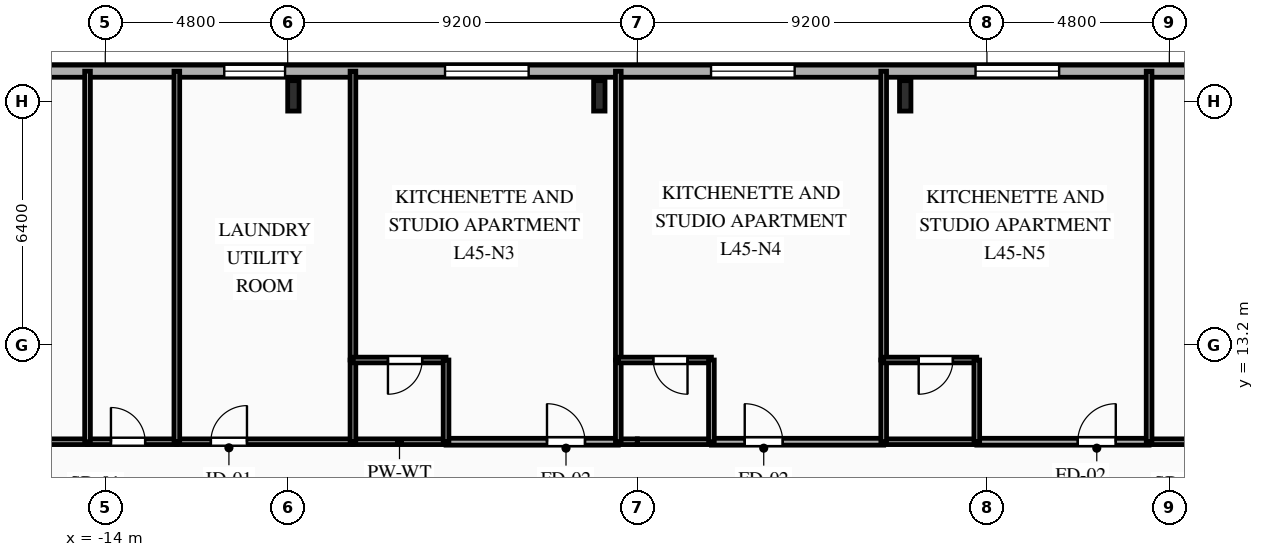
"""IFC4 building model, lengths in metres.
Left out: names, types, materials, properties, quantities, classifications, styles, units other than length and angle.
Written with IfcOpenShell. Run it as: python <this file> out.ifc"""

import sys

from ifc_helpers import new_model, si_unit, direction, frame, frame_2d, origin, origin_2d, place, context, subcontext, project, spatial, rectangle, i_section, extrude, element, fill, save


model = new_model("IFC4")
c1 = context("Model", 3, precision=1e-05, world=origin(), true_north=direction((0.0, 1.0)))
c2 = subcontext(c1, "Body", "Model", "MODEL_VIEW")
j1 = project(units=[si_unit("LENGTHUNIT", "METRE"), si_unit("PLANEANGLEUNIT", "RADIAN")], contexts=[c1])
p1 = place(None, origin())
s1 = spatial("IfcSite", under=j1, at=p1, CompositionType="ELEMENT")
p2 = place(p1, origin())
s2 = spatial("IfcBuilding", under=s1, at=p2, CompositionType="ELEMENT")
p3 = place(p2, frame((0.0, 0.0, 161.15)))
s3 = spatial("IfcBuildingStorey", under=s2, at=p3, CompositionType="ELEMENT", Elevation=161.15)
for number, where, z_axis, x_axis in (
    (1, (7.05, 19.75, 0.0), (0.0, 0.0, 1.0), (1.0, 0.0, 0.0)),
    (2, (-1.0, 19.75, 0.0), (0.0, 0.0, 1.0), (1.0, 0.0, 0.0)),
    (3, (-9.05, 19.75, 0.0), (0.0, 0.0, 1.0), (1.0, 0.0, 0.0)),
):
    element("IfcColumn", number, at=place(p3, frame(where, z_axis=z_axis, x_axis=x_axis)), inside=s3, PredefinedType="COLUMN", context=c2, shape_type="SweptSolid", body=[
        extrude(i_section(OverallWidth=0.3, OverallDepth=0.8, WebThickness=0.018, FlangeThickness=0.033, FilletRadius=0.03, at=origin_2d()), origin(), (0.0, 0.0, 1.0), 3.35),
    ])
p4 = place(p3, frame((-25.8, 20.4, 0.0), z_axis=(0.0, 0.0, 1.0), x_axis=(1.0, 0.0, 0.0)))
e4 = element("IfcWall", 4, at=p4, inside=s3, PredefinedType="SOLIDWALL", context=c2, shape_type="SweptSolid", body=[
    extrude(rectangle(XDim=49.6, YDim=0.32, at=frame_2d((24.8, 0.0))), origin(), (0.0, 0.0, 1.0), 3.04),
])
p5 = place(p4, frame((2.135, 0.0, 0.85)))
e5 = element("IfcOpeningElement", 5, at=p5, cuts=e4, PredefinedType="OPENING", context=c2, shape_type="SweptSolid", body=[
    extrude(rectangle(XDim=1.65, YDim=1.85, at=frame_2d((0.825, 0.925))), frame((0.0, 0.17, 0.0), z_axis=(0.0, -1.0, 0.0), x_axis=(1.0, 0.0, 0.0)), (0.0, 0.0, 1.0), 0.34),
])
p6 = place(p4, frame((6.706, 0.0, 0.85)))
e6 = element("IfcOpeningElement", 6, at=p6, cuts=e4, PredefinedType="OPENING", context=c2, shape_type="SweptSolid", body=[
    extrude(rectangle(XDim=1.65, YDim=1.85, at=frame_2d((0.825, 0.925))), frame((0.0, 0.17, 0.0), z_axis=(0.0, -1.0, 0.0), x_axis=(1.0, 0.0, 0.0)), (0.0, 0.0, 1.0), 0.34),
])
p7 = place(p4, frame((14.931, 0.0, 0.85)))
e7 = element("IfcOpeningElement", 7, at=p7, cuts=e4, PredefinedType="OPENING", context=c2, shape_type="SweptSolid", body=[
    extrude(rectangle(XDim=1.6, YDim=1.85, at=frame_2d((0.8, 0.925))), frame((0.0, 0.17, 0.0), z_axis=(0.0, -1.0, 0.0), x_axis=(1.0, 0.0, 0.0)), (0.0, 0.0, 1.0), 0.34),
])
p8 = place(p4, frame((20.74, 0.0, 0.85)))
e8 = element("IfcOpeningElement", 8, at=p8, cuts=e4, PredefinedType="OPENING", context=c2, shape_type="SweptSolid", body=[
    extrude(rectangle(XDim=2.2, YDim=1.85, at=frame_2d((1.1, 0.925))), frame((0.0, 0.17, 0.0), z_axis=(0.0, -1.0, 0.0), x_axis=(1.0, 0.0, 0.0)), (0.0, 0.0, 1.0), 0.34),
])
p9 = place(p4, frame((27.74, 0.0, 0.85)))
e9 = element("IfcOpeningElement", 9, at=p9, cuts=e4, PredefinedType="OPENING", context=c2, shape_type="SweptSolid", body=[
    extrude(rectangle(XDim=2.2, YDim=1.85, at=frame_2d((1.1, 0.925))), frame((0.0, 0.17, 0.0), z_axis=(0.0, -1.0, 0.0), x_axis=(1.0, 0.0, 0.0)), (0.0, 0.0, 1.0), 0.34),
])
p10 = place(p4, frame((34.7, 0.0, 0.85)))
e10 = element("IfcOpeningElement", 10, at=p10, cuts=e4, PredefinedType="OPENING", context=c2, shape_type="SweptSolid", body=[
    extrude(rectangle(XDim=2.2, YDim=1.85, at=frame_2d((1.1, 0.925))), frame((0.0, 0.17, 0.0), z_axis=(0.0, -1.0, 0.0), x_axis=(1.0, 0.0, 0.0)), (0.0, 0.0, 1.0), 0.34),
])
p11 = place(p4, frame((42.215, 0.0, 0.85)))
e11 = element("IfcOpeningElement", 11, at=p11, cuts=e4, PredefinedType="OPENING", context=c2, shape_type="SweptSolid", body=[
    extrude(rectangle(XDim=1.65, YDim=1.85, at=frame_2d((0.825, 0.925))), frame((0.0, 0.17, 0.0), z_axis=(0.0, -1.0, 0.0), x_axis=(1.0, 0.0, 0.0)), (0.0, 0.0, 1.0), 0.34),
])
p12 = place(p4, frame((47.45, 0.0, 0.85)))
e12 = element("IfcOpeningElement", 12, at=p12, cuts=e4, PredefinedType="OPENING", context=c2, shape_type="SweptSolid", body=[
    extrude(rectangle(XDim=1.1, YDim=1.85, at=frame_2d((0.55, 0.925))), frame((0.0, 0.17, 0.0), z_axis=(0.0, -1.0, 0.0), x_axis=(1.0, 0.0, 0.0)), (0.0, 0.0, 1.0), 0.34),
])
p13 = place(p3, frame((-20.95, 10.65, 0.0), z_axis=(0.0, 0.0, 1.0), x_axis=(1.0, 0.0, 0.0)))
e13 = element("IfcWall", 13, at=p13, inside=s3, PredefinedType="PARTITIONING", context=c2, shape_type="SweptSolid", body=[
    extrude(rectangle(XDim=6.483, YDim=0.15, at=frame_2d((3.241, 0.0))), origin(), (0.0, 0.0, 1.0), 3.04),
])
p14 = place(p13, frame((4.319, 0.0, 0.0)))
e14 = element("IfcOpeningElement", 14, at=p14, cuts=e13, PredefinedType="OPENING", context=c2, shape_type="SweptSolid", body=[
    extrude(rectangle(XDim=1.05, YDim=2.15, at=frame_2d((0.525, 1.075))), frame((0.0, 0.085, 0.0), z_axis=(0.0, -1.0, 0.0), x_axis=(1.0, 0.0, 0.0)), (0.0, 0.0, 1.0), 0.17),
])
p15 = place(p3, frame((-14.467, 10.65, 0.0), z_axis=(0.0, 0.0, 1.0), x_axis=(1.0, 0.0, 0.0)))
e15 = element("IfcWall", 15, at=p15, inside=s3, PredefinedType="PLUMBINGWALL", context=c2, shape_type="SweptSolid", body=[
    extrude(rectangle(XDim=2.35, YDim=0.15, at=frame_2d((1.175, 0.0))), origin(), (0.0, 0.0, 1.0), 3.04),
])
p16 = place(p15, frame((0.616, 0.0, 0.0)))
e16 = element("IfcOpeningElement", 16, at=p16, cuts=e15, PredefinedType="OPENING", context=c2, shape_type="SweptSolid", body=[
    extrude(rectangle(XDim=0.9, YDim=2.1, at=frame_2d((0.45, 1.05))), frame((0.0, 0.085, 0.0), z_axis=(0.0, -1.0, 0.0), x_axis=(1.0, 0.0, 0.0)), (0.0, 0.0, 1.0), 0.17),
])
p17 = place(p3, frame((-12.117, 10.65, 0.0), z_axis=(0.0, 0.0, 1.0), x_axis=(1.0, 0.0, 0.0)))
e17 = element("IfcWall", 17, at=p17, inside=s3, PredefinedType="PARTITIONING", context=c2, shape_type="SweptSolid", body=[
    extrude(rectangle(XDim=4.634, YDim=0.15, at=frame_2d((2.317, 0.0))), origin(), (0.0, 0.0, 1.0), 3.04),
])
p18 = place(p17, frame((0.896, 0.0, 0.0)))
e18 = element("IfcOpeningElement", 18, at=p18, cuts=e17, PredefinedType="OPENING", context=c2, shape_type="SweptSolid", body=[
    extrude(rectangle(XDim=0.95, YDim=2.1, at=frame_2d((0.475, 1.05))), frame((0.0, 0.085, 0.0), z_axis=(0.0, -1.0, 0.0), x_axis=(1.0, 0.0, 0.0)), (0.0, 0.0, 1.0), 0.17),
])
p19 = place(p3, frame((-5.033, 10.65, 0.0), z_axis=(0.0, 0.0, 1.0), x_axis=(1.0, 0.0, 0.0)))
e19 = element("IfcWall", 19, at=p19, inside=s3, PredefinedType="PARTITIONING", context=c2, shape_type="SweptSolid", body=[
    extrude(rectangle(XDim=4.533, YDim=0.18, at=frame_2d((2.267, 0.0))), origin(), (0.0, 0.0, 1.0), 3.04),
])
p20 = place(p19, frame((2.656, 0.0, 0.0)))
e20 = element("IfcOpeningElement", 20, at=p20, cuts=e19, PredefinedType="OPENING", context=c2, shape_type="SweptSolid", body=[
    extrude(rectangle(XDim=1.0, YDim=2.15, at=frame_2d((0.5, 1.075))), frame((0.0, 0.1, 0.0), z_axis=(0.0, -1.0, 0.0), x_axis=(1.0, 0.0, 0.0)), (0.0, 0.0, 1.0), 0.2),
])
p21 = place(p3, frame((-7.483, 10.65, 0.0), z_axis=(0.0, 0.0, 1.0), x_axis=(1.0, 0.0, 0.0)))
e21 = element("IfcWall", 21, at=p21, inside=s3, PredefinedType="PLUMBINGWALL", context=c2, shape_type="SweptSolid", body=[
    extrude(rectangle(XDim=2.45, YDim=0.15, at=frame_2d((1.225, 0.0))), origin(), (0.0, 0.0, 1.0), 3.04),
])
p22 = place(p3, frame((-0.5, 10.65, 0.0), z_axis=(0.0, 0.0, 1.0), x_axis=(1.0, 0.0, 0.0)))
e22 = element("IfcWall", 22, at=p22, inside=s3, PredefinedType="PLUMBINGWALL", context=c2, shape_type="SweptSolid", body=[
    extrude(rectangle(XDim=0.5, YDim=0.15, at=frame_2d((0.25, 0.0))), origin(), (0.0, 0.0, 1.0), 3.04),
])
p23 = place(p3, frame((1.95, 10.65, 0.0), z_axis=(0.0, 0.0, 1.0), x_axis=(1.0, 0.0, 0.0)))
e23 = element("IfcWall", 23, at=p23, inside=s3, PredefinedType="PARTITIONING", context=c2, shape_type="SweptSolid", body=[
    extrude(rectangle(XDim=4.533, YDim=0.18, at=frame_2d((2.267, 0.0))), origin(), (0.0, 0.0, 1.0), 3.04),
])
p24 = place(p23, frame((0.877, 0.0, 0.0)))
e24 = element("IfcOpeningElement", 24, at=p24, cuts=e23, PredefinedType="OPENING", context=c2, shape_type="SweptSolid", body=[
    extrude(rectangle(XDim=1.0, YDim=2.15, at=frame_2d((0.5, 1.075))), frame((0.0, 0.1, 0.0), z_axis=(0.0, -1.0, 0.0), x_axis=(1.0, 0.0, 0.0)), (0.0, 0.0, 1.0), 0.2),
])
p25 = place(p3, frame((0.0, 10.65, 0.0), z_axis=(0.0, 0.0, 1.0), x_axis=(1.0, 0.0, 0.0)))
e25 = element("IfcWall", 25, at=p25, inside=s3, PredefinedType="PLUMBINGWALL", context=c2, shape_type="SweptSolid", body=[
    extrude(rectangle(XDim=1.95, YDim=0.15, at=frame_2d((0.975, 0.0))), origin(), (0.0, 0.0, 1.0), 3.04),
])
p26 = place(p3, frame((8.933, 10.65, 0.0), z_axis=(0.0, 0.0, 1.0), x_axis=(1.0, 0.0, 0.0)))
e26 = element("IfcWall", 26, at=p26, inside=s3, PredefinedType="PARTITIONING", context=c2, shape_type="SweptSolid", body=[
    extrude(rectangle(XDim=4.534, YDim=0.18, at=frame_2d((2.267, 0.0))), origin(), (0.0, 0.0, 1.0), 3.04),
])
p27 = place(p26, frame((2.657, 0.0, 0.0)))
e27 = element("IfcOpeningElement", 27, at=p27, cuts=e26, PredefinedType="OPENING", context=c2, shape_type="SweptSolid", body=[
    extrude(rectangle(XDim=1.0, YDim=2.15, at=frame_2d((0.5, 1.075))), frame((0.0, 0.1, 0.0), z_axis=(0.0, -1.0, 0.0), x_axis=(1.0, 0.0, 0.0)), (0.0, 0.0, 1.0), 0.2),
])
p28 = place(p3, frame((6.483, 10.65, 0.0), z_axis=(0.0, 0.0, 1.0), x_axis=(1.0, 0.0, 0.0)))
e28 = element("IfcWall", 28, at=p28, inside=s3, PredefinedType="PLUMBINGWALL", context=c2, shape_type="SweptSolid", body=[
    extrude(rectangle(XDim=2.45, YDim=0.15, at=frame_2d((1.225, 0.0))), origin(), (0.0, 0.0, 1.0), 3.04),
])
p29 = place(p3, frame((13.467, 10.65, 0.0), z_axis=(0.0, 0.0, 1.0), x_axis=(1.0, 0.0, 0.0)))
e29 = element("IfcWall", 29, at=p29, inside=s3, PredefinedType="PARTITIONING", context=c2, shape_type="SweptSolid", body=[
    extrude(rectangle(XDim=7.483, YDim=0.15, at=frame_2d((3.741, 0.0))), origin(), (0.0, 0.0, 1.0), 3.04),
])
p30 = place(p29, frame((1.239, 0.0, 0.0)))
e30 = element("IfcOpeningElement", 30, at=p30, cuts=e29, PredefinedType="OPENING", context=c2, shape_type="SweptSolid", body=[
    extrude(rectangle(XDim=1.05, YDim=2.15, at=frame_2d((0.525, 1.075))), frame((0.0, 0.085, 0.0), z_axis=(0.0, -1.0, 0.0), x_axis=(1.0, 0.0, 0.0)), (0.0, 0.0, 1.0), 0.17),
])
for number, where, z_axis, x_axis in (
    (31, (-14.467, 20.4, 0.0), (0.0, 0.0, 1.0), (0.0, -1.0, 0.0)),
    (32, (-12.117, 20.4, 0.0), (0.0, 0.0, 1.0), (0.0, -1.0, 0.0)),
):
    element("IfcWall", number, at=place(p3, frame(where, z_axis=z_axis, x_axis=x_axis)), inside=s3, PredefinedType="PLUMBINGWALL", context=c2, shape_type="SweptSolid", body=[
        extrude(rectangle(XDim=9.75, YDim=0.15, at=frame_2d((4.875, 0.0))), origin(), (0.0, 0.0, 1.0), 3.04),
    ])
p31 = place(p3, frame((-7.483, 20.4, 0.0), z_axis=(0.0, 0.0, 1.0), x_axis=(0.0, -1.0, 0.0)))
e33 = element("IfcWall", 33, at=p31, inside=s3, PredefinedType="PARTITIONING", context=c2, shape_type="SweptSolid", body=[
    extrude(rectangle(XDim=7.6, YDim=0.15, at=frame_2d((3.8, 0.0))), origin(), (0.0, 0.0, 1.0), 3.04),
])
p32 = place(p3, frame((-7.483, 12.8, 0.0), z_axis=(0.0, 0.0, 1.0), x_axis=(0.0, -1.0, 0.0)))
e34 = element("IfcWall", 34, at=p32, inside=s3, PredefinedType="PLUMBINGWALL", context=c2, shape_type="SweptSolid", body=[
    extrude(rectangle(XDim=2.15, YDim=0.15, at=frame_2d((1.075, 0.0))), origin(), (0.0, 0.0, 1.0), 3.04),
])
p33 = place(p3, frame((-5.033, 12.8, 0.0), z_axis=(0.0, 0.0, 1.0), x_axis=(-1.0, 0.0, 0.0)))
e35 = element("IfcWall", 35, at=p33, inside=s3, PredefinedType="PLUMBINGWALL", context=c2, shape_type="SweptSolid", body=[
    extrude(rectangle(XDim=2.45, YDim=0.15, at=frame_2d((1.225, 0.0))), origin(), (0.0, 0.0, 1.0), 3.04),
])
p34 = place(p33, frame((0.629, 0.0, 0.0)))
e36 = element("IfcOpeningElement", 36, at=p34, cuts=e35, PredefinedType="OPENING", context=c2, shape_type="SweptSolid", body=[
    extrude(rectangle(XDim=0.9, YDim=2.1, at=frame_2d((0.45, 1.05))), frame((0.0, 0.085, 0.0), z_axis=(0.0, -1.0, 0.0), x_axis=(1.0, 0.0, 0.0)), (0.0, 0.0, 1.0), 0.17),
])
p35 = place(p3, frame((-5.033, 10.65, 0.0), z_axis=(0.0, 0.0, 1.0), x_axis=(0.0, 1.0, 0.0)))
e37 = element("IfcWall", 37, at=p35, inside=s3, PredefinedType="PLUMBINGWALL", context=c2, shape_type="SweptSolid", body=[
    extrude(rectangle(XDim=2.15, YDim=0.15, at=frame_2d((1.075, 0.0))), origin(), (0.0, 0.0, 1.0), 3.04),
])
p36 = place(p3, frame((-0.5, 20.4, 0.0), z_axis=(0.0, 0.0, 1.0), x_axis=(0.0, -1.0, 0.0)))
e38 = element("IfcWall", 38, at=p36, inside=s3, PredefinedType="PARTITIONING", context=c2, shape_type="SweptSolid", body=[
    extrude(rectangle(XDim=7.6, YDim=0.15, at=frame_2d((3.8, 0.0))), origin(), (0.0, 0.0, 1.0), 3.04),
])
p37 = place(p3, frame((-0.5, 12.8, 0.0), z_axis=(0.0, 0.0, 1.0), x_axis=(0.0, -1.0, 0.0)))
e39 = element("IfcWall", 39, at=p37, inside=s3, PredefinedType="PLUMBINGWALL", context=c2, shape_type="SweptSolid", body=[
    extrude(rectangle(XDim=2.15, YDim=0.15, at=frame_2d((1.075, 0.0))), origin(), (0.0, 0.0, 1.0), 3.04),
])
p38 = place(p3, frame((1.95, 12.8, 0.0), z_axis=(0.0, 0.0, 1.0), x_axis=(-1.0, 0.0, 0.0)))
e40 = element("IfcWall", 40, at=p38, inside=s3, PredefinedType="PLUMBINGWALL", context=c2, shape_type="SweptSolid", body=[
    extrude(rectangle(XDim=2.45, YDim=0.15, at=frame_2d((1.225, 0.0))), origin(), (0.0, 0.0, 1.0), 3.04),
])
p39 = place(p38, frame((0.629, 0.0, 0.0)))
e41 = element("IfcOpeningElement", 41, at=p39, cuts=e40, PredefinedType="OPENING", context=c2, shape_type="SweptSolid", body=[
    extrude(rectangle(XDim=0.9, YDim=2.1, at=frame_2d((0.45, 1.05))), frame((0.0, 0.085, 0.0), z_axis=(0.0, -1.0, 0.0), x_axis=(1.0, 0.0, 0.0)), (0.0, 0.0, 1.0), 0.17),
])
p40 = place(p3, frame((1.95, 10.65, 0.0), z_axis=(0.0, 0.0, 1.0), x_axis=(0.0, 1.0, 0.0)))
e42 = element("IfcWall", 42, at=p40, inside=s3, PredefinedType="PLUMBINGWALL", context=c2, shape_type="SweptSolid", body=[
    extrude(rectangle(XDim=2.15, YDim=0.15, at=frame_2d((1.075, 0.0))), origin(), (0.0, 0.0, 1.0), 3.04),
])
p41 = place(p3, frame((6.483, 20.4, 0.0), z_axis=(0.0, 0.0, 1.0), x_axis=(0.0, -1.0, 0.0)))
e43 = element("IfcWall", 43, at=p41, inside=s3, PredefinedType="PARTITIONING", context=c2, shape_type="SweptSolid", body=[
    extrude(rectangle(XDim=7.6, YDim=0.15, at=frame_2d((3.8, 0.0))), origin(), (0.0, 0.0, 1.0), 3.04),
])
p42 = place(p3, frame((6.483, 12.8, 0.0), z_axis=(0.0, 0.0, 1.0), x_axis=(0.0, -1.0, 0.0)))
e44 = element("IfcWall", 44, at=p42, inside=s3, PredefinedType="PLUMBINGWALL", context=c2, shape_type="SweptSolid", body=[
    extrude(rectangle(XDim=2.15, YDim=0.15, at=frame_2d((1.075, 0.0))), origin(), (0.0, 0.0, 1.0), 3.04),
])
p43 = place(p3, frame((8.933, 12.8, 0.0), z_axis=(0.0, 0.0, 1.0), x_axis=(-1.0, 0.0, 0.0)))
e45 = element("IfcWall", 45, at=p43, inside=s3, PredefinedType="PLUMBINGWALL", context=c2, shape_type="SweptSolid", body=[
    extrude(rectangle(XDim=2.45, YDim=0.15, at=frame_2d((1.225, 0.0))), origin(), (0.0, 0.0, 1.0), 3.04),
])
p44 = place(p43, frame((0.629, 0.0, 0.0)))
e46 = element("IfcOpeningElement", 46, at=p44, cuts=e45, PredefinedType="OPENING", context=c2, shape_type="SweptSolid", body=[
    extrude(rectangle(XDim=0.9, YDim=2.1, at=frame_2d((0.45, 1.05))), frame((0.0, 0.085, 0.0), z_axis=(0.0, -1.0, 0.0), x_axis=(1.0, 0.0, 0.0)), (0.0, 0.0, 1.0), 0.17),
])
p45 = place(p3, frame((8.933, 10.65, 0.0), z_axis=(0.0, 0.0, 1.0), x_axis=(0.0, 1.0, 0.0)))
e47 = element("IfcWall", 47, at=p45, inside=s3, PredefinedType="PLUMBINGWALL", context=c2, shape_type="SweptSolid", body=[
    extrude(rectangle(XDim=2.15, YDim=0.15, at=frame_2d((1.075, 0.0))), origin(), (0.0, 0.0, 1.0), 3.04),
])
p46 = place(p3, frame((13.467, 20.4, 0.0), z_axis=(0.0, 0.0, 1.0), x_axis=(0.0, -1.0, 0.0)))
e48 = element("IfcWall", 48, at=p46, inside=s3, PredefinedType="PARTITIONING", context=c2, shape_type="SweptSolid", body=[
    extrude(rectangle(XDim=9.75, YDim=0.15, at=frame_2d((4.875, 0.0))), origin(), (0.0, 0.0, 1.0), 3.04),
])
p47 = place(p7, origin())
e49 = element("IfcWindow", 49, at=p47, inside=s3, PartitioningType="SINGLE_PANEL", PredefinedType="WINDOW", context=c2, shape_type="SweptSolid", body=[
    extrude(rectangle(XDim=1.6, YDim=1.85, at=frame_2d((0.8, 0.925))), frame((0.0, 0.03, 0.0), z_axis=(0.0, -1.0, 0.0), x_axis=(1.0, 0.0, 0.0)), (0.0, 0.0, 1.0), 0.06),
])
fill(e7, e49)
p48 = place(p8, origin())
e50 = element("IfcWindow", 50, at=p48, inside=s3, PartitioningType="SINGLE_PANEL", PredefinedType="WINDOW", context=c2, shape_type="SweptSolid", body=[
    extrude(rectangle(XDim=2.2, YDim=1.85, at=frame_2d((1.1, 0.925))), frame((0.0, 0.03, 0.0), z_axis=(0.0, -1.0, 0.0), x_axis=(1.0, 0.0, 0.0)), (0.0, 0.0, 1.0), 0.06),
])
fill(e8, e50)
p49 = place(p9, origin())
e51 = element("IfcWindow", 51, at=p49, inside=s3, PartitioningType="SINGLE_PANEL", PredefinedType="WINDOW", context=c2, shape_type="SweptSolid", body=[
    extrude(rectangle(XDim=2.2, YDim=1.85, at=frame_2d((1.1, 0.925))), frame((0.0, 0.03, 0.0), z_axis=(0.0, -1.0, 0.0), x_axis=(1.0, 0.0, 0.0)), (0.0, 0.0, 1.0), 0.06),
])
fill(e9, e51)
p50 = place(p10, origin())
e52 = element("IfcWindow", 52, at=p50, inside=s3, PartitioningType="SINGLE_PANEL", PredefinedType="WINDOW", context=c2, shape_type="SweptSolid", body=[
    extrude(rectangle(XDim=2.2, YDim=1.85, at=frame_2d((1.1, 0.925))), frame((0.0, 0.03, 0.0), z_axis=(0.0, -1.0, 0.0), x_axis=(1.0, 0.0, 0.0)), (0.0, 0.0, 1.0), 0.06),
])
fill(e10, e52)
p51 = place(p16, origin())
e53 = element("IfcDoor", 53, at=p51, inside=s3, OperationType="SINGLE_SWING_LEFT", PredefinedType="DOOR", context=c2, shape_type="SweptSolid", body=[
    extrude(rectangle(XDim=0.9, YDim=2.1, at=frame_2d((0.45, 1.05))), frame((0.0, 0.025, 0.0), z_axis=(0.0, -1.0, 0.0), x_axis=(1.0, 0.0, 0.0)), (0.0, 0.0, 1.0), 0.05),
])
fill(e16, e53)
p52 = place(p18, origin())
e54 = element("IfcDoor", 54, at=p52, inside=s3, OperationType="SINGLE_SWING_RIGHT", PredefinedType="DOOR", context=c2, shape_type="SweptSolid", body=[
    extrude(rectangle(XDim=0.95, YDim=2.1, at=frame_2d((0.475, 1.05))), frame((0.0, 0.025, 0.0), z_axis=(0.0, -1.0, 0.0), x_axis=(1.0, 0.0, 0.0)), (0.0, 0.0, 1.0), 0.05),
])
fill(e18, e54)
p53 = place(p20, origin())
e55 = element("IfcDoor", 55, at=p53, inside=s3, OperationType="SINGLE_SWING_LEFT", PredefinedType="DOOR", context=c2, shape_type="SweptSolid", body=[
    extrude(rectangle(XDim=1.0, YDim=2.15, at=frame_2d((0.5, 1.075))), frame((0.0, 0.025, 0.0), z_axis=(0.0, -1.0, 0.0), x_axis=(1.0, 0.0, 0.0)), (0.0, 0.0, 1.0), 0.05),
])
fill(e20, e55)
p54 = place(p24, origin())
e56 = element("IfcDoor", 56, at=p54, inside=s3, OperationType="SINGLE_SWING_LEFT", PredefinedType="DOOR", context=c2, shape_type="SweptSolid", body=[
    extrude(rectangle(XDim=1.0, YDim=2.15, at=frame_2d((0.5, 1.075))), frame((0.0, 0.025, 0.0), z_axis=(0.0, -1.0, 0.0), x_axis=(1.0, 0.0, 0.0)), (0.0, 0.0, 1.0), 0.05),
])
fill(e24, e56)
p55 = place(p27, origin())
e57 = element("IfcDoor", 57, at=p55, inside=s3, OperationType="SINGLE_SWING_RIGHT", PredefinedType="DOOR", context=c2, shape_type="SweptSolid", body=[
    extrude(rectangle(XDim=1.0, YDim=2.15, at=frame_2d((0.5, 1.075))), frame((0.0, 0.025, 0.0), z_axis=(0.0, -1.0, 0.0), x_axis=(1.0, 0.0, 0.0)), (0.0, 0.0, 1.0), 0.05),
])
fill(e27, e57)
p56 = place(p34, origin())
e58 = element("IfcDoor", 58, at=p56, inside=s3, OperationType="SINGLE_SWING_RIGHT", PredefinedType="DOOR", context=c2, shape_type="SweptSolid", body=[
    extrude(rectangle(XDim=0.9, YDim=2.1, at=frame_2d((0.45, 1.05))), frame((0.0, 0.025, 0.0), z_axis=(0.0, -1.0, 0.0), x_axis=(1.0, 0.0, 0.0)), (0.0, 0.0, 1.0), 0.05),
])
fill(e36, e58)
p57 = place(p39, origin())
e59 = element("IfcDoor", 59, at=p57, inside=s3, OperationType="SINGLE_SWING_LEFT", PredefinedType="DOOR", context=c2, shape_type="SweptSolid", body=[
    extrude(rectangle(XDim=0.9, YDim=2.1, at=frame_2d((0.45, 1.05))), frame((0.0, 0.025, 0.0), z_axis=(0.0, -1.0, 0.0), x_axis=(1.0, 0.0, 0.0)), (0.0, 0.0, 1.0), 0.05),
])
fill(e41, e59)
p58 = place(p44, origin())
e60 = element("IfcDoor", 60, at=p58, inside=s3, OperationType="SINGLE_SWING_RIGHT", PredefinedType="DOOR", context=c2, shape_type="SweptSolid", body=[
    extrude(rectangle(XDim=0.9, YDim=2.1, at=frame_2d((0.45, 1.05))), frame((0.0, 0.025, 0.0), z_axis=(0.0, -1.0, 0.0), x_axis=(1.0, 0.0, 0.0)), (0.0, 0.0, 1.0), 0.05),
])
fill(e46, e60)
save(model, sys.argv[1])
